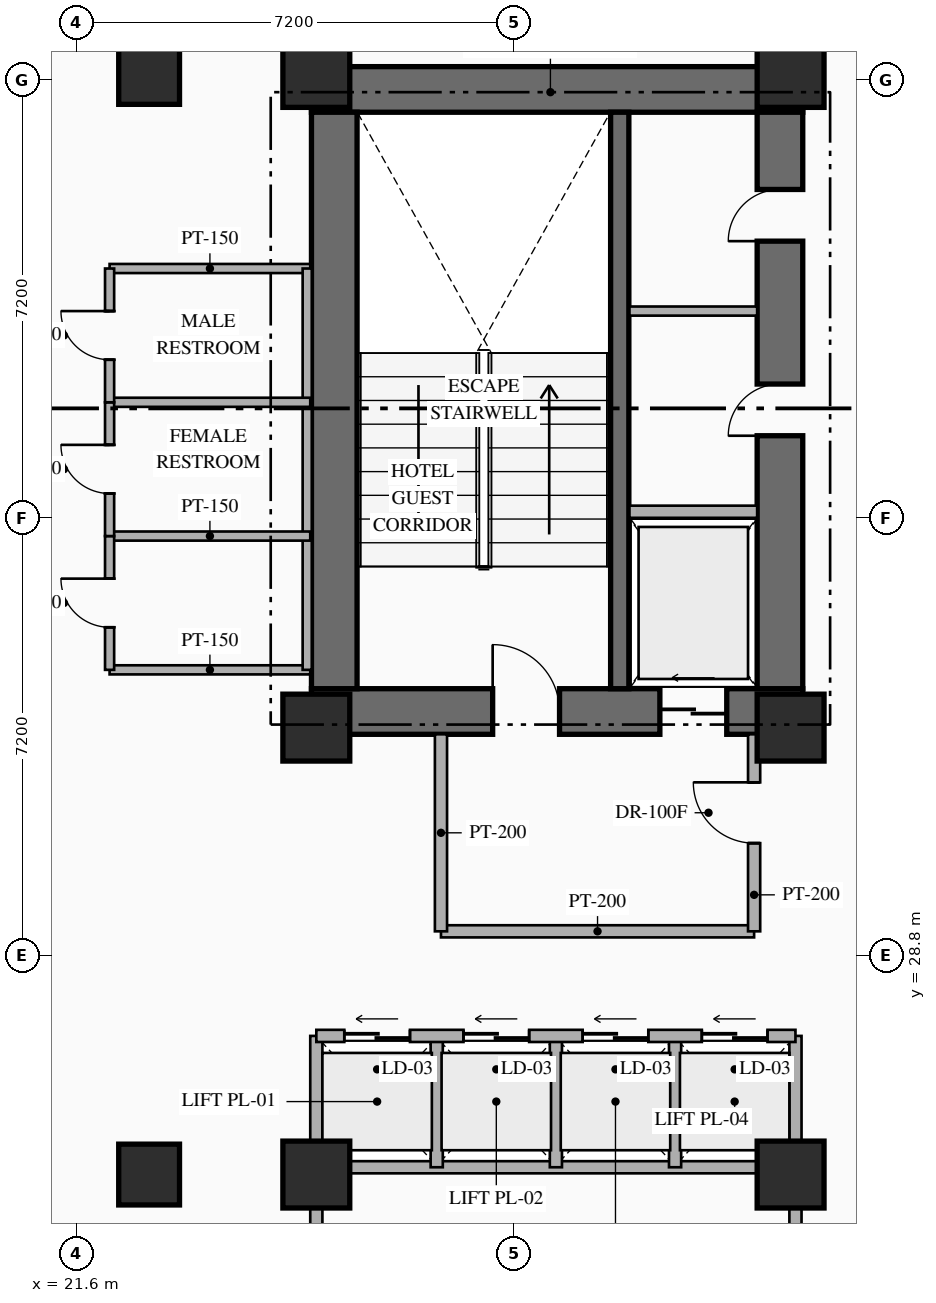
"""IFC4 building model, lengths in metres.
Left out: names, types, materials, properties, quantities, classifications, styles, units other than length and angle.
Written with IfcOpenShell. Run it as: python <this file> out.ifc"""

import sys

from ifc_helpers import new_model, si_unit, direction, frame, frame_2d, origin, origin_2d, place, context, subcontext, project, spatial, rectangle, hollow_rectangle, extrude, element, fill, save


model = new_model("IFC4")
c1 = context("Model", 3, precision=1e-05, world=origin(), true_north=direction((0.0, 1.0)))
c2 = subcontext(c1, "Body", "Model", "MODEL_VIEW")
j1 = project(units=[si_unit("LENGTHUNIT", "METRE"), si_unit("PLANEANGLEUNIT", "RADIAN")], contexts=[c1])
p1 = place(None, origin())
s1 = spatial("IfcSite", under=j1, at=p1, CompositionType="ELEMENT")
p2 = place(p1, origin())
s2 = spatial("IfcBuilding", under=s1, at=p2, CompositionType="ELEMENT")
p3 = place(p2, frame((0.0, 0.0, 56.7)))
s3 = spatial("IfcBuildingStorey", under=s2, at=p3, CompositionType="ELEMENT", Elevation=56.7)
p4 = place(p3, frame((25.47, 32.815, 0.0), z_axis=(0.0, 0.0, 1.0), x_axis=(1.0, 0.0, 0.0)))
e1 = element("IfcWall", 1, at=p4, inside=s3, PredefinedType="SHEAR", context=c2, shape_type="SweptSolid", body=[
    extrude(rectangle(XDim=8.08, YDim=0.75, at=frame_2d((4.04, 0.0))), origin(), (0.0, 0.0, 1.0), 3.35),
])
p5 = place(p4, frame((2.98, 0.0, 0.0)))
e2 = element("IfcOpeningElement", 2, at=p5, cuts=e1, PredefinedType="OPENING", context=c2, shape_type="SweptSolid", body=[
    extrude(rectangle(XDim=1.1, YDim=2.2, at=frame_2d((0.55, 1.1))), frame((0.0, 0.385, 0.0), z_axis=(0.0, -1.0, 0.0), x_axis=(1.0, 0.0, 0.0)), (0.0, 0.0, 1.0), 0.77),
])
p6 = place(p4, frame((5.73, 0.0, 0.0)))
e3 = element("IfcOpeningElement", 3, at=p6, cuts=e1, PredefinedType="OPENING", context=c2, shape_type="SweptSolid", body=[
    extrude(rectangle(XDim=1.1, YDim=2.15, at=frame_2d((0.55, 1.075))), frame((0.0, 0.385, 0.0), z_axis=(0.0, -1.0, 0.0), x_axis=(1.0, 0.0, 0.0)), (0.0, 0.0, 1.0), 0.77),
])
p7 = place(p3, frame((25.47, 43.045, 0.0), z_axis=(0.0, 0.0, 1.0), x_axis=(1.0, 0.0, 0.0)))
e4 = element("IfcWall", 4, at=p7, inside=s3, PredefinedType="SHEAR", context=c2, shape_type="SweptSolid", body=[
    extrude(rectangle(XDim=8.08, YDim=0.75, at=frame_2d((4.04, 0.0))), origin(), (0.0, 0.0, 1.0), 3.35),
])
p8 = place(p3, frame((25.845, 33.19, 0.0), z_axis=(0.0, 0.0, 1.0), x_axis=(0.0, 1.0, 0.0)))
e5 = element("IfcWall", 5, at=p8, inside=s3, PredefinedType="SHEAR", context=c2, shape_type="SweptSolid", body=[
    extrude(rectangle(XDim=9.48, YDim=0.75, at=frame_2d((4.74, 0.0))), origin(), (0.0, 0.0, 1.0), 3.35),
])
p9 = place(p3, frame((33.175, 33.19, 0.0), z_axis=(0.0, 0.0, 1.0), x_axis=(0.0, 1.0, 0.0)))
e6 = element("IfcWall", 6, at=p9, inside=s3, PredefinedType="SHEAR", context=c2, shape_type="SweptSolid", body=[
    extrude(rectangle(XDim=9.48, YDim=0.75, at=frame_2d((4.74, 0.0))), origin(), (0.0, 0.0, 1.0), 3.35),
])
p10 = place(p9, frame((4.16, 0.0, 0.0)))
e7 = element("IfcOpeningElement", 7, at=p10, cuts=e6, PredefinedType="OPENING", context=c2, shape_type="SweptSolid", body=[
    extrude(rectangle(XDim=0.85, YDim=2.08, at=frame_2d((0.425, 1.04))), frame((0.0, 0.385, 0.0), z_axis=(0.0, -1.0, 0.0), x_axis=(1.0, 0.0, 0.0)), (0.0, 0.0, 1.0), 0.77),
])
p11 = place(p9, frame((7.36, 0.0, 0.0)))
e8 = element("IfcOpeningElement", 8, at=p11, cuts=e6, PredefinedType="OPENING", context=c2, shape_type="SweptSolid", body=[
    extrude(rectangle(XDim=0.85, YDim=2.08, at=frame_2d((0.425, 1.04))), frame((0.0, 0.385, 0.0), z_axis=(0.0, -1.0, 0.0), x_axis=(1.0, 0.0, 0.0)), (0.0, 0.0, 1.0), 0.77),
])
p12 = place(p3, frame((30.54, 33.19, 0.0), z_axis=(0.0, 0.0, 1.0), x_axis=(0.0, 1.0, 0.0)))
e9 = element("IfcWall", 9, at=p12, inside=s3, PredefinedType="SHEAR", context=c2, shape_type="SweptSolid", body=[
    extrude(rectangle(XDim=9.48, YDim=0.3, at=frame_2d((4.74, 0.0))), origin(), (0.0, 0.0, 1.0), 3.35),
])
for number, where, z_axis, x_axis in (
    (10, (25.55, 32.55, 0.0), (0.0, 0.0, 1.0), (1.0, 0.0, 0.0)),
    (11, (33.35, 32.55, 0.0), (0.0, 0.0, 1.0), (1.0, 0.0, 0.0)),
    (12, (25.55, 43.3, 0.0), (0.0, 0.0, 1.0), (1.0, 0.0, 0.0)),
    (13, (33.35, 43.3, 0.0), (0.0, 0.0, 1.0), (1.0, 0.0, 0.0)),
):
    element("IfcColumn", number, at=place(p3, frame(where, z_axis=z_axis, x_axis=x_axis)), inside=s3, PredefinedType="COLUMN", context=c2, shape_type="SweptSolid", body=[
        extrude(rectangle(XDim=1.1, YDim=1.1, at=origin_2d()), origin(), (0.0, 0.0, 1.0), 3.35),
    ])
for number, where, z_axis, x_axis in (
    (14, (25.55, 25.2, 0.0), (0.0, 0.0, 1.0), (1.0, 0.0, 0.0)),
    (15, (33.35, 25.2, 0.0), (0.0, 0.0, 1.0), (1.0, 0.0, 0.0)),
):
    element("IfcColumn", number, at=place(p3, frame(where, z_axis=z_axis, x_axis=x_axis)), inside=s3, PredefinedType="COLUMN", context=c2, shape_type="SweptSolid", body=[
        extrude(hollow_rectangle(XDim=1.1, YDim=1.1, WallThickness=0.04, at=origin_2d()), origin(), (0.0, 0.0, 1.0), 3.35),
    ])
for number, where, z_axis, x_axis in (
    (16, (22.8, 25.2, 0.0), (0.0, 0.0, 1.0), (1.0, 0.0, 0.0)),
    (17, (22.8, 43.3, 0.0), (0.0, 0.0, 1.0), (1.0, 0.0, 0.0)),
):
    element("IfcColumn", number, at=place(p3, frame(where, z_axis=z_axis, x_axis=x_axis)), inside=s3, PredefinedType="COLUMN", context=c2, shape_type="SweptSolid", body=[
        extrude(hollow_rectangle(XDim=1.0, YDim=1.0, WallThickness=0.038, at=origin_2d()), origin(), (0.0, 0.0, 1.0), 3.35),
    ])
p13 = place(p3, frame((30.7, 36.1, 0.0), z_axis=(0.0, 0.0, 1.0), x_axis=(1.0, 0.0, 0.0)))
e18 = element("IfcWall", 18, at=p13, inside=s3, PredefinedType="STANDARD", context=c2, shape_type="SweptSolid", body=[
    extrude(rectangle(XDim=2.1, YDim=0.2, at=frame_2d((1.05, 0.0))), origin(), (0.0, 0.0, 1.0), 3.13),
])
p14 = place(p3, frame((30.7, 39.4, 0.0), z_axis=(0.0, 0.0, 1.0), x_axis=(1.0, 0.0, 0.0)))
e19 = element("IfcWall", 19, at=p14, inside=s3, PredefinedType="PARTITIONING", context=c2, shape_type="SweptSolid", body=[
    extrude(rectangle(XDim=2.1, YDim=0.15, at=frame_2d((1.05, 0.0))), origin(), (0.0, 0.0, 1.0), 3.13),
])
p15 = place(p3, frame((27.6, 29.2, 0.0), z_axis=(0.0, 0.0, 1.0), x_axis=(1.0, 0.0, 0.0)))
e20 = element("IfcWall", 20, at=p15, inside=s3, PredefinedType="STANDARD", context=c2, shape_type="SweptSolid", body=[
    extrude(rectangle(XDim=5.15, YDim=0.2, at=frame_2d((2.575, 0.0))), origin(), (0.0, 0.0, 1.0), 3.13),
])
p16 = place(p3, frame((27.6, 29.2, 0.0), z_axis=(0.0, 0.0, 1.0), x_axis=(0.0, 1.0, 0.0)))
e21 = element("IfcWall", 21, at=p16, inside=s3, PredefinedType="STANDARD", context=c2, shape_type="SweptSolid", body=[
    extrude(rectangle(XDim=3.24, YDim=0.2, at=frame_2d((1.62, 0.0))), origin(), (0.0, 0.0, 1.0), 3.13),
])
p17 = place(p3, frame((32.75, 29.2, 0.0), z_axis=(0.0, 0.0, 1.0), x_axis=(0.0, 1.0, 0.0)))
e22 = element("IfcWall", 22, at=p17, inside=s3, PredefinedType="STANDARD", context=c2, shape_type="SweptSolid", body=[
    extrude(rectangle(XDim=3.24, YDim=0.2, at=frame_2d((1.62, 0.0))), origin(), (0.0, 0.0, 1.0), 3.13),
])
p18 = place(p17, frame((1.45, 0.0, 0.0)))
e23 = element("IfcOpeningElement", 23, at=p18, cuts=e22, PredefinedType="OPENING", context=c2, shape_type="SweptSolid", body=[
    extrude(rectangle(XDim=1.0, YDim=2.2, at=frame_2d((0.5, 1.1))), frame((0.0, 0.11, 0.0), z_axis=(0.0, -1.0, 0.0), x_axis=(1.0, 0.0, 0.0)), (0.0, 0.0, 1.0), 0.22),
])
for number, where, z_axis, x_axis in (
    (24, (25.55, 23.4, 0.0), (0.0, 0.0, 1.0), (0.0, 1.0, 0.0)),
    (25, (33.43, 23.4, 0.0), (0.0, 0.0, 1.0), (0.0, 1.0, 0.0)),
):
    element("IfcWall", number, at=place(p3, frame(where, z_axis=z_axis, x_axis=x_axis)), inside=s3, PredefinedType="STANDARD", context=c2, shape_type="SweptSolid", body=[
        extrude(rectangle(XDim=4.08, YDim=0.2, at=frame_2d((2.04, 0.0))), origin(), (0.0, 0.0, 1.0), 2.425),
    ])
p19 = place(p3, frame((25.55, 25.32, 0.0), z_axis=(0.0, 0.0, 1.0), x_axis=(1.0, 0.0, 0.0)))
e26 = element("IfcWall", 26, at=p19, inside=s3, PredefinedType="STANDARD", context=c2, shape_type="SweptSolid", body=[
    extrude(rectangle(XDim=7.88, YDim=0.2, at=frame_2d((3.94, 0.0))), origin(), (0.0, 0.0, 1.0), 2.525),
])
for number, where, z_axis, x_axis in (
    (27, (27.53, 25.32, 0.0), (0.0, 0.0, 1.0), (0.0, 1.0, 0.0)),
    (28, (29.49, 25.32, 0.0), (0.0, 0.0, 1.0), (0.0, 1.0, 0.0)),
    (29, (31.45, 25.32, 0.0), (0.0, 0.0, 1.0), (0.0, 1.0, 0.0)),
):
    element("IfcWall", number, at=place(p3, frame(where, z_axis=z_axis, x_axis=x_axis)), inside=s3, PredefinedType="STANDARD", context=c2, shape_type="SweptSolid", body=[
        extrude(rectangle(XDim=2.16, YDim=0.2, at=frame_2d((1.08, 0.0))), origin(), (0.0, 0.0, 1.0), 3.13),
    ])
p20 = place(p3, frame((25.55, 27.48, 0.0), z_axis=(0.0, 0.0, 1.0), x_axis=(1.0, 0.0, 0.0)))
e30 = element("IfcWall", 30, at=p20, inside=s3, PredefinedType="STANDARD", context=c2, shape_type="SweptSolid", body=[
    extrude(rectangle(XDim=7.88, YDim=0.2, at=frame_2d((3.94, 0.0))), origin(), (0.0, 0.0, 1.0), 3.13),
])
p21 = place(p20, frame((0.46, 0.0, 0.0)))
e31 = element("IfcOpeningElement", 31, at=p21, cuts=e30, PredefinedType="OPENING", context=c2, shape_type="SweptSolid", body=[
    extrude(rectangle(XDim=1.08, YDim=2.15, at=frame_2d((0.54, 1.075))), frame((0.0, 0.11, 0.0), z_axis=(0.0, -1.0, 0.0), x_axis=(1.0, 0.0, 0.0)), (0.0, 0.0, 1.0), 0.22),
])
p22 = place(p20, frame((2.42, 0.0, 0.0)))
e32 = element("IfcOpeningElement", 32, at=p22, cuts=e30, PredefinedType="OPENING", context=c2, shape_type="SweptSolid", body=[
    extrude(rectangle(XDim=1.08, YDim=2.15, at=frame_2d((0.54, 1.075))), frame((0.0, 0.11, 0.0), z_axis=(0.0, -1.0, 0.0), x_axis=(1.0, 0.0, 0.0)), (0.0, 0.0, 1.0), 0.22),
])
p23 = place(p20, frame((4.38, 0.0, 0.0)))
e33 = element("IfcOpeningElement", 33, at=p23, cuts=e30, PredefinedType="OPENING", context=c2, shape_type="SweptSolid", body=[
    extrude(rectangle(XDim=1.08, YDim=2.15, at=frame_2d((0.54, 1.075))), frame((0.0, 0.11, 0.0), z_axis=(0.0, -1.0, 0.0), x_axis=(1.0, 0.0, 0.0)), (0.0, 0.0, 1.0), 0.22),
])
p24 = place(p20, frame((6.34, 0.0, 0.0)))
e34 = element("IfcOpeningElement", 34, at=p24, cuts=e30, PredefinedType="OPENING", context=c2, shape_type="SweptSolid", body=[
    extrude(rectangle(XDim=1.08, YDim=2.15, at=frame_2d((0.54, 1.075))), frame((0.0, 0.11, 0.0), z_axis=(0.0, -1.0, 0.0), x_axis=(1.0, 0.0, 0.0)), (0.0, 0.0, 1.0), 0.22),
])
for number, where, z_axis, x_axis in (
    (35, (22.15, 33.5, 0.0), (0.0, 0.0, 1.0), (1.0, 0.0, 0.0)),
    (36, (22.15, 40.1, 0.0), (0.0, 0.0, 1.0), (1.0, 0.0, 0.0)),
):
    element("IfcWall", number, at=place(p3, frame(where, z_axis=z_axis, x_axis=x_axis)), inside=s3, PredefinedType="PARTITIONING", context=c2, shape_type="SweptSolid", body=[
        extrude(rectangle(XDim=3.3, YDim=0.15, at=frame_2d((1.65, 0.0))), origin(), (0.0, 0.0, 1.0), 3.13),
    ])
p25 = place(p3, frame((25.4, 33.5, 0.0), z_axis=(0.0, 0.0, 1.0), x_axis=(0.0, 1.0, 0.0)))
e37 = element("IfcWall", 37, at=p25, inside=s3, PredefinedType="PARTITIONING", context=c2, shape_type="SweptSolid", body=[
    extrude(rectangle(XDim=6.6, YDim=0.15, at=frame_2d((3.3, 0.0))), origin(), (0.0, 0.0, 1.0), 3.13),
])
for number, where, z_axis, x_axis in (
    (38, (22.15, 35.7, 0.0), (0.0, 0.0, 1.0), (1.0, 0.0, 0.0)),
    (39, (22.15, 37.9, 0.0), (0.0, 0.0, 1.0), (1.0, 0.0, 0.0)),
):
    element("IfcWall", number, at=place(p3, frame(where, z_axis=z_axis, x_axis=x_axis)), inside=s3, PredefinedType="PARTITIONING", context=c2, shape_type="SweptSolid", body=[
        extrude(rectangle(XDim=3.3, YDim=0.15, at=frame_2d((1.65, 0.0))), origin(), (0.0, 0.0, 1.0), 3.13),
    ])
p26 = place(p3, frame((22.15, 33.5, 0.0), z_axis=(0.0, 0.0, 1.0), x_axis=(0.0, 1.0, 0.0)))
e40 = element("IfcWall", 40, at=p26, inside=s3, PredefinedType="PARTITIONING", context=c2, shape_type="SweptSolid", body=[
    extrude(rectangle(XDim=2.2, YDim=0.15, at=frame_2d((1.1, 0.0))), origin(), (0.0, 0.0, 1.0), 3.13),
])
p27 = place(p26, frame((0.7, 0.0, 0.0)))
e41 = element("IfcOpeningElement", 41, at=p27, cuts=e40, PredefinedType="OPENING", context=c2, shape_type="SweptSolid", body=[
    extrude(rectangle(XDim=0.8, YDim=2.06, at=frame_2d((0.4, 1.03))), frame((0.0, 0.085, 0.0), z_axis=(0.0, -1.0, 0.0), x_axis=(1.0, 0.0, 0.0)), (0.0, 0.0, 1.0), 0.17),
])
p28 = place(p3, frame((22.15, 35.7, 0.0), z_axis=(0.0, 0.0, 1.0), x_axis=(0.0, 1.0, 0.0)))
e42 = element("IfcWall", 42, at=p28, inside=s3, PredefinedType="PARTITIONING", context=c2, shape_type="SweptSolid", body=[
    extrude(rectangle(XDim=2.2, YDim=0.15, at=frame_2d((1.1, 0.0))), origin(), (0.0, 0.0, 1.0), 3.13),
])
p29 = place(p28, frame((0.7, 0.0, 0.0)))
e43 = element("IfcOpeningElement", 43, at=p29, cuts=e42, PredefinedType="OPENING", context=c2, shape_type="SweptSolid", body=[
    extrude(rectangle(XDim=0.8, YDim=2.06, at=frame_2d((0.4, 1.03))), frame((0.0, 0.085, 0.0), z_axis=(0.0, -1.0, 0.0), x_axis=(1.0, 0.0, 0.0)), (0.0, 0.0, 1.0), 0.17),
])
p30 = place(p3, frame((22.15, 37.9, 0.0), z_axis=(0.0, 0.0, 1.0), x_axis=(0.0, 1.0, 0.0)))
e44 = element("IfcWall", 44, at=p30, inside=s3, PredefinedType="PARTITIONING", context=c2, shape_type="SweptSolid", body=[
    extrude(rectangle(XDim=2.2, YDim=0.15, at=frame_2d((1.1, 0.0))), origin(), (0.0, 0.0, 1.0), 3.13),
])
p31 = place(p30, frame((0.7, 0.0, 0.0)))
e45 = element("IfcOpeningElement", 45, at=p31, cuts=e44, PredefinedType="OPENING", context=c2, shape_type="SweptSolid", body=[
    extrude(rectangle(XDim=0.8, YDim=2.06, at=frame_2d((0.4, 1.03))), frame((0.0, 0.085, 0.0), z_axis=(0.0, -1.0, 0.0), x_axis=(1.0, 0.0, 0.0)), (0.0, 0.0, 1.0), 0.17),
])
p32 = place(p3, frame((33.384, 17.312, 0.0), z_axis=(0.0, 0.0, 1.0), x_axis=(0.600008743659, 0.799993442181, 0.0)))
e46 = element("IfcWall", 46, at=p32, inside=s3, PredefinedType="PARTITIONING", context=c2, shape_type="SweptSolid", body=[
    extrude(rectangle(XDim=8.935, YDim=0.15, at=frame_2d((4.468, 0.0))), origin(), (0.0, 0.0, 1.0), 3.13),
])
p33 = place(p5, origin())
e47 = element("IfcDoor", 47, at=p33, inside=s3, OperationType="SINGLE_SWING_LEFT", PredefinedType="DOOR", context=c2, shape_type="SweptSolid", body=[
    extrude(rectangle(XDim=1.1, YDim=2.2, at=frame_2d((0.55, 1.1))), frame((0.0, 0.025, 0.0), z_axis=(0.0, -1.0, 0.0), x_axis=(1.0, 0.0, 0.0)), (0.0, 0.0, 1.0), 0.05),
])
fill(e2, e47)
p34 = place(p6, origin())
e48 = element("IfcDoor", 48, at=p34, inside=s3, OperationType="SLIDING_TO_LEFT", PredefinedType="USERDEFINED", context=c2, shape_type="SweptSolid", body=[
    extrude(rectangle(XDim=1.1, YDim=2.15, at=frame_2d((0.55, 1.075))), frame((0.0, 0.025, 0.0), z_axis=(0.0, -1.0, 0.0), x_axis=(1.0, 0.0, 0.0)), (0.0, 0.0, 1.0), 0.05),
])
fill(e3, e48)
p35 = place(p10, origin())
e49 = element("IfcDoor", 49, at=p35, inside=s3, OperationType="SINGLE_SWING_LEFT", PredefinedType="DOOR", context=c2, shape_type="SweptSolid", body=[
    extrude(rectangle(XDim=0.85, YDim=2.08, at=frame_2d((0.425, 1.04))), frame((0.0, 0.025, 0.0), z_axis=(0.0, -1.0, 0.0), x_axis=(1.0, 0.0, 0.0)), (0.0, 0.0, 1.0), 0.05),
])
fill(e7, e49)
p36 = place(p11, origin())
e50 = element("IfcDoor", 50, at=p36, inside=s3, OperationType="SINGLE_SWING_LEFT", PredefinedType="DOOR", context=c2, shape_type="SweptSolid", body=[
    extrude(rectangle(XDim=0.85, YDim=2.08, at=frame_2d((0.425, 1.04))), frame((0.0, 0.025, 0.0), z_axis=(0.0, -1.0, 0.0), x_axis=(1.0, 0.0, 0.0)), (0.0, 0.0, 1.0), 0.05),
])
fill(e8, e50)
p37 = place(p18, origin())
e51 = element("IfcDoor", 51, at=p37, inside=s3, OperationType="SINGLE_SWING_RIGHT", PredefinedType="DOOR", context=c2, shape_type="SweptSolid", body=[
    extrude(rectangle(XDim=1.0, YDim=2.2, at=frame_2d((0.5, 1.1))), frame((0.0, 0.025, 0.0), z_axis=(0.0, -1.0, 0.0), x_axis=(1.0, 0.0, 0.0)), (0.0, 0.0, 1.0), 0.05),
])
fill(e23, e51)
p38 = place(p21, origin())
e52 = element("IfcDoor", 52, at=p38, inside=s3, OperationType="SLIDING_TO_LEFT", PredefinedType="USERDEFINED", context=c2, shape_type="SweptSolid", body=[
    extrude(rectangle(XDim=1.08, YDim=2.15, at=frame_2d((0.54, 1.075))), frame((0.0, 0.025, 0.0), z_axis=(0.0, -1.0, 0.0), x_axis=(1.0, 0.0, 0.0)), (0.0, 0.0, 1.0), 0.05),
])
fill(e31, e52)
p39 = place(p22, origin())
e53 = element("IfcDoor", 53, at=p39, inside=s3, OperationType="SLIDING_TO_LEFT", PredefinedType="USERDEFINED", context=c2, shape_type="SweptSolid", body=[
    extrude(rectangle(XDim=1.08, YDim=2.15, at=frame_2d((0.54, 1.075))), frame((0.0, 0.025, 0.0), z_axis=(0.0, -1.0, 0.0), x_axis=(1.0, 0.0, 0.0)), (0.0, 0.0, 1.0), 0.05),
])
fill(e32, e53)
p40 = place(p23, origin())
e54 = element("IfcDoor", 54, at=p40, inside=s3, OperationType="SLIDING_TO_LEFT", PredefinedType="USERDEFINED", context=c2, shape_type="SweptSolid", body=[
    extrude(rectangle(XDim=1.08, YDim=2.15, at=frame_2d((0.54, 1.075))), frame((0.0, 0.025, 0.0), z_axis=(0.0, -1.0, 0.0), x_axis=(1.0, 0.0, 0.0)), (0.0, 0.0, 1.0), 0.05),
])
fill(e33, e54)
p41 = place(p24, origin())
e55 = element("IfcDoor", 55, at=p41, inside=s3, OperationType="SLIDING_TO_LEFT", PredefinedType="USERDEFINED", context=c2, shape_type="SweptSolid", body=[
    extrude(rectangle(XDim=1.08, YDim=2.15, at=frame_2d((0.54, 1.075))), frame((0.0, 0.025, 0.0), z_axis=(0.0, -1.0, 0.0), x_axis=(1.0, 0.0, 0.0)), (0.0, 0.0, 1.0), 0.05),
])
fill(e34, e55)
p42 = place(p27, origin())
e56 = element("IfcDoor", 56, at=p42, inside=s3, OperationType="SINGLE_SWING_RIGHT", PredefinedType="DOOR", context=c2, shape_type="SweptSolid", body=[
    extrude(rectangle(XDim=0.8, YDim=2.06, at=frame_2d((0.4, 1.03))), frame((0.0, 0.025, 0.0), z_axis=(0.0, -1.0, 0.0), x_axis=(1.0, 0.0, 0.0)), (0.0, 0.0, 1.0), 0.05),
])
fill(e41, e56)
p43 = place(p29, origin())
e57 = element("IfcDoor", 57, at=p43, inside=s3, OperationType="SINGLE_SWING_RIGHT", PredefinedType="DOOR", context=c2, shape_type="SweptSolid", body=[
    extrude(rectangle(XDim=0.8, YDim=2.06, at=frame_2d((0.4, 1.03))), frame((0.0, 0.025, 0.0), z_axis=(0.0, -1.0, 0.0), x_axis=(1.0, 0.0, 0.0)), (0.0, 0.0, 1.0), 0.05),
])
fill(e43, e57)
p44 = place(p31, origin())
e58 = element("IfcDoor", 58, at=p44, inside=s3, OperationType="SINGLE_SWING_RIGHT", PredefinedType="DOOR", context=c2, shape_type="SweptSolid", body=[
    extrude(rectangle(XDim=0.8, YDim=2.06, at=frame_2d((0.4, 1.03))), frame((0.0, 0.025, 0.0), z_axis=(0.0, -1.0, 0.0), x_axis=(1.0, 0.0, 0.0)), (0.0, 0.0, 1.0), 0.05),
])
fill(e45, e58)
save(model, sys.argv[1])
